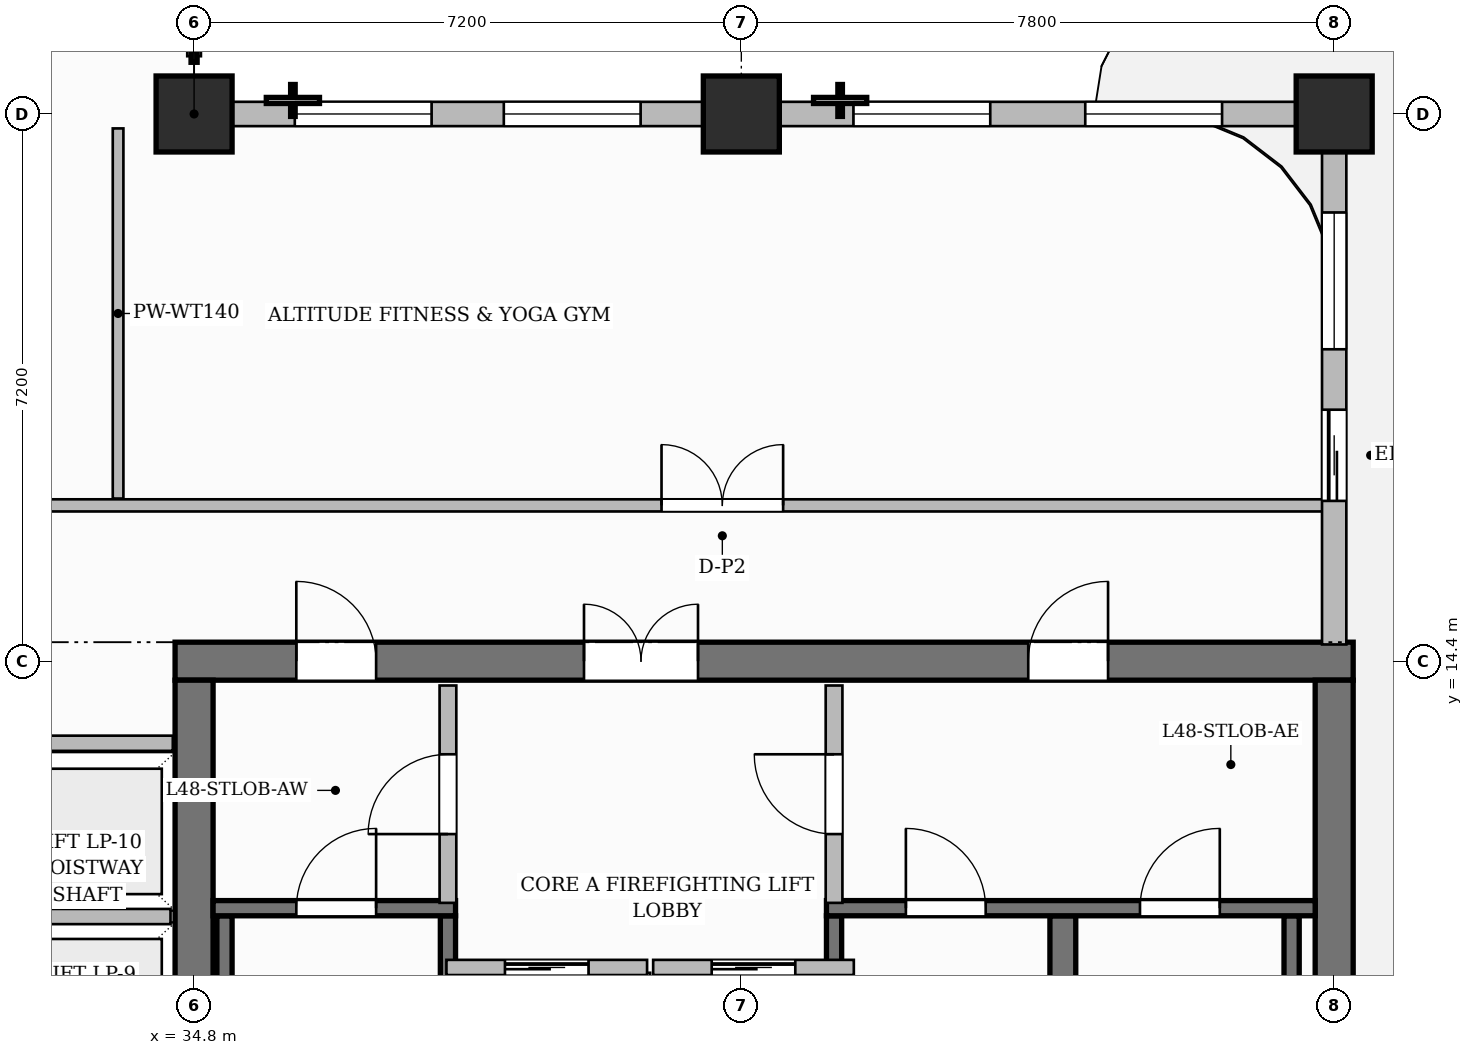
"""IFC4 building model, lengths in metres.
Left out: names, types, materials, properties, quantities, classifications, styles, units other than length and angle.
Written with IfcOpenShell. Run it as: python <this file> out.ifc"""

import sys

from ifc_helpers import new_model, si_unit, direction, frame, frame_2d, origin, origin_2d, place, context, subcontext, project, spatial, rectangle, extrude, source, transform, mapped, element, fill, save


model = new_model("IFC4")
c1 = context("Model", 3, precision=1e-05, world=origin(), true_north=direction((0.0, 1.0)))
c2 = subcontext(c1, "Body", "Model", "MODEL_VIEW")
j1 = project(units=[si_unit("LENGTHUNIT", "METRE"), si_unit("PLANEANGLEUNIT", "RADIAN")], contexts=[c1])
p1 = place(None, origin())
s1 = spatial("IfcSite", under=j1, at=p1, CompositionType="ELEMENT")
p2 = place(p1, origin())
s2 = spatial("IfcBuilding", under=s1, at=p2, CompositionType="ELEMENT")
p3 = place(p2, frame((0.0, 0.0, 192.65)))
s3 = spatial("IfcBuildingStorey", under=s2, at=p3, CompositionType="ELEMENT", Elevation=192.65)
p4 = place(p3, frame((34.55, 14.4, 0.0), z_axis=(0.0, 0.0, 1.0), x_axis=(1.0, 0.0, 0.0)))
e1 = element("IfcWall", 1, at=p4, inside=s3, PredefinedType="SHEAR", context=c2, shape_type="SweptSolid", body=[
    extrude(rectangle(XDim=15.5, YDim=0.5, at=frame_2d((7.75, 0.0))), origin(), (0.0, 0.0, 1.0), 3.85),
])
p5 = place(p4, frame((5.38, 0.0, 0.0)))
e2 = element("IfcOpeningElement", 2, at=p5, cuts=e1, PredefinedType="OPENING", context=c2, shape_type="SweptSolid", body=[
    extrude(rectangle(XDim=1.5, YDim=2.2, at=frame_2d((0.75, 1.1))), frame((0.0, 0.26, 0.0), z_axis=(0.0, -1.0, 0.0), x_axis=(1.0, 0.0, 0.0)), (0.0, 0.0, 1.0), 0.52),
])
p6 = place(p4, frame((1.595, 0.0, 0.0)))
e3 = element("IfcOpeningElement", 3, at=p6, cuts=e1, PredefinedType="OPENING", context=c2, shape_type="SweptSolid", body=[
    extrude(rectangle(XDim=1.05, YDim=2.15, at=frame_2d((0.525, 1.075))), frame((0.0, 0.26, 0.0), z_axis=(0.0, -1.0, 0.0), x_axis=(1.0, 0.0, 0.0)), (0.0, 0.0, 1.0), 0.52),
])
p7 = place(p4, frame((11.225, 0.0, 0.0)))
e4 = element("IfcOpeningElement", 4, at=p7, cuts=e1, PredefinedType="OPENING", context=c2, shape_type="SweptSolid", body=[
    extrude(rectangle(XDim=1.05, YDim=2.15, at=frame_2d((0.525, 1.075))), frame((0.0, 0.26, 0.0), z_axis=(0.0, -1.0, 0.0), x_axis=(1.0, 0.0, 0.0)), (0.0, 0.0, 1.0), 0.52),
])
for number, where, z_axis, x_axis in (
    (5, (34.8, 3.85, 0.0), (0.0, 0.0, 1.0), (0.0, 1.0, 0.0)),
    (6, (49.8, 3.85, 0.0), (0.0, 0.0, 1.0), (0.0, 1.0, 0.0)),
):
    element("IfcWall", number, at=place(p3, frame(where, z_axis=z_axis, x_axis=x_axis)), inside=s3, PredefinedType="SHEAR", context=c2, shape_type="SweptSolid", body=[
        extrude(rectangle(XDim=10.3, YDim=0.5, at=frame_2d((5.15, 0.0))), origin(), (0.0, 0.0, 1.0), 3.85),
    ])
m1 = source(origin(), c2, "Body", "SweptSolid", [
    extrude(rectangle(XDim=1.0, YDim=1.0, at=origin_2d()), origin(), (0.0, 0.0, 1.0), 3.85),
])
for number, where, z_axis, x_axis in (
    (7, (34.8, 21.6, 0.0), (0.0, 0.0, 1.0), (1.0, 0.0, 0.0)),
    (8, (42.0, 21.6, 0.0), (0.0, 0.0, 1.0), (1.0, 0.0, 0.0)),
    (9, (49.8, 21.6, 0.0), (0.0, 0.0, 1.0), (1.0, 0.0, 0.0)),
):
    element("IfcColumn", number, at=place(p3, frame(where, z_axis=z_axis, x_axis=x_axis)), inside=s3, PredefinedType="COLUMN", context=c2, shape_type="MappedRepresentation", body=[
        mapped(m1, transform((0.0, 0.0, 0.0), scale=1.0)),
    ])
for number, where, z_axis, x_axis in (
    (10, (35.2, 4.1, 0.0), (0.0, 0.0, 1.0), (0.0, 1.0, 0.0)),
    (11, (38.14, 4.1, 0.0), (0.0, 0.0, 1.0), (0.0, 1.0, 0.0)),
):
    element("IfcWall", number, at=place(p3, frame(where, z_axis=z_axis, x_axis=x_axis)), inside=s3, PredefinedType="SHEAR", context=c2, shape_type="SweptSolid", body=[
        extrude(rectangle(XDim=6.95, YDim=0.2, at=frame_2d((3.475, 0.0))), origin(), (0.0, 0.0, 1.0), 3.85),
    ])
p8 = place(p3, frame((35.05, 11.15, 0.0), z_axis=(0.0, 0.0, 1.0), x_axis=(1.0, 0.0, 0.0)))
e12 = element("IfcWall", 12, at=p8, inside=s3, PredefinedType="SHEAR", context=c2, shape_type="SweptSolid", body=[
    extrude(rectangle(XDim=3.19, YDim=0.2, at=frame_2d((1.595, 0.0))), origin(), (0.0, 0.0, 1.0), 3.85),
])
p9 = place(p8, frame((1.095, 0.0, 0.0)))
e13 = element("IfcOpeningElement", 13, at=p9, cuts=e12, PredefinedType="OPENING", context=c2, shape_type="SweptSolid", body=[
    extrude(rectangle(XDim=1.05, YDim=2.2, at=frame_2d((0.525, 1.1))), frame((0.0, 0.11, 0.0), z_axis=(0.0, -1.0, 0.0), x_axis=(1.0, 0.0, 0.0)), (0.0, 0.0, 1.0), 0.22),
])
p10 = place(p3, frame((43.22, 4.1, 0.0), z_axis=(0.0, 0.0, 1.0), x_axis=(0.0, 1.0, 0.0)))
e14 = element("IfcWall", 14, at=p10, inside=s3, PredefinedType="SHEAR", context=c2, shape_type="SweptSolid", body=[
    extrude(rectangle(XDim=6.95, YDim=0.2, at=frame_2d((3.475, 0.0))), origin(), (0.0, 0.0, 1.0), 3.85),
])
p11 = place(p3, frame((46.23, 4.1, 0.0), z_axis=(0.0, 0.0, 1.0), x_axis=(0.0, 1.0, 0.0)))
e15 = element("IfcWall", 15, at=p11, inside=s3, PredefinedType="SHEAR", context=c2, shape_type="SweptSolid", body=[
    extrude(rectangle(XDim=6.95, YDim=0.34, at=frame_2d((3.475, 0.0))), origin(), (0.0, 0.0, 1.0), 3.85),
])
p12 = place(p3, frame((49.24, 4.1, 0.0), z_axis=(0.0, 0.0, 1.0), x_axis=(0.0, 1.0, 0.0)))
e16 = element("IfcWall", 16, at=p12, inside=s3, PredefinedType="SHEAR", context=c2, shape_type="SweptSolid", body=[
    extrude(rectangle(XDim=6.95, YDim=0.2, at=frame_2d((3.475, 0.0))), origin(), (0.0, 0.0, 1.0), 3.85),
])
p13 = place(p3, frame((43.12, 11.15, 0.0), z_axis=(0.0, 0.0, 1.0), x_axis=(1.0, 0.0, 0.0)))
e17 = element("IfcWall", 17, at=p13, inside=s3, PredefinedType="SHEAR", context=c2, shape_type="SweptSolid", body=[
    extrude(rectangle(XDim=6.43, YDim=0.2, at=frame_2d((3.215, 0.0))), origin(), (0.0, 0.0, 1.0), 3.85),
])
p14 = place(p13, frame((1.045, 0.0, 0.0)))
e18 = element("IfcOpeningElement", 18, at=p14, cuts=e17, PredefinedType="OPENING", context=c2, shape_type="SweptSolid", body=[
    extrude(rectangle(XDim=1.05, YDim=2.2, at=frame_2d((0.525, 1.1))), frame((0.0, 0.11, 0.0), z_axis=(0.0, -1.0, 0.0), x_axis=(1.0, 0.0, 0.0)), (0.0, 0.0, 1.0), 0.22),
])
p15 = place(p13, frame((4.125, 0.0, 0.0)))
e19 = element("IfcOpeningElement", 19, at=p15, cuts=e17, PredefinedType="OPENING", context=c2, shape_type="SweptSolid", body=[
    extrude(rectangle(XDim=1.05, YDim=2.2, at=frame_2d((0.525, 1.1))), frame((0.0, 0.11, 0.0), z_axis=(0.0, -1.0, 0.0), x_axis=(1.0, 0.0, 0.0)), (0.0, 0.0, 1.0), 0.22),
])
p16 = place(p3, frame((40.7, 8.12, 0.0), z_axis=(0.0, 0.0, 1.0), x_axis=(0.0, 1.0, 0.0)))
e20 = element("IfcWall", 20, at=p16, inside=s3, PredefinedType="PARTITIONING", context=c2, shape_type="SweptSolid", body=[
    extrude(rectangle(XDim=2.18, YDim=0.2, at=frame_2d((1.09, 0.0))), origin(), (0.0, 0.0, 1.0), 3.55),
])
p17 = place(p3, frame((38.14, 11.22, 0.0), z_axis=(0.0, 0.0, 1.0), x_axis=(0.0, 1.0, 0.0)))
e21 = element("IfcWall", 21, at=p17, inside=s3, PredefinedType="PARTITIONING", context=c2, shape_type="SweptSolid", body=[
    extrude(rectangle(XDim=2.86, YDim=0.22, at=frame_2d((1.43, 0.0))), origin(), (0.0, 0.0, 1.0), 3.55),
])
p18 = place(p17, frame((0.905, 0.0, 0.0)))
e22 = element("IfcOpeningElement", 22, at=p18, cuts=e21, PredefinedType="OPENING", context=c2, shape_type="SweptSolid", body=[
    extrude(rectangle(XDim=1.05, YDim=2.15, at=frame_2d((0.525, 1.075))), frame((0.0, 0.12, 0.0), z_axis=(0.0, -1.0, 0.0), x_axis=(1.0, 0.0, 0.0)), (0.0, 0.0, 1.0), 0.24),
])
p19 = place(p3, frame((43.22, 11.22, 0.0), z_axis=(0.0, 0.0, 1.0), x_axis=(0.0, 1.0, 0.0)))
e23 = element("IfcWall", 23, at=p19, inside=s3, PredefinedType="PARTITIONING", context=c2, shape_type="SweptSolid", body=[
    extrude(rectangle(XDim=2.86, YDim=0.22, at=frame_2d((1.43, 0.0))), origin(), (0.0, 0.0, 1.0), 3.55),
])
p20 = place(p19, frame((0.905, 0.0, 0.0)))
e24 = element("IfcOpeningElement", 24, at=p20, cuts=e23, PredefinedType="OPENING", context=c2, shape_type="SweptSolid", body=[
    extrude(rectangle(XDim=1.05, YDim=2.15, at=frame_2d((0.525, 1.075))), frame((0.0, 0.12, 0.0), z_axis=(0.0, -1.0, 0.0), x_axis=(1.0, 0.0, 0.0)), (0.0, 0.0, 1.0), 0.24),
])
p21 = place(p3, frame((32.16, 13.32, 0.0), z_axis=(0.0, 0.0, 1.0), x_axis=(1.0, 0.0, 0.0)))
e25 = element("IfcWall", 25, at=p21, inside=s3, PredefinedType="PARTITIONING", context=c2, shape_type="SweptSolid", body=[
    extrude(rectangle(XDim=2.36, YDim=0.2, at=frame_2d((1.18, 0.0))), origin(), (0.0, 0.0, 1.0), 3.55),
])
p22 = place(p3, frame((32.26, 11.04, 0.0), z_axis=(0.0, 0.0, 1.0), x_axis=(1.0, 0.0, 0.0)))
e26 = element("IfcWall", 26, at=p22, inside=s3, PredefinedType="PARTITIONING", context=c2, shape_type="SweptSolid", body=[
    extrude(rectangle(XDim=2.23, YDim=0.2, at=frame_2d((1.115, 0.0))), origin(), (0.0, 0.0, 1.0), 3.55),
])
p23 = place(p3, frame((30.29, 16.45, 0.0), z_axis=(0.0, 0.0, 1.0), x_axis=(1.0, 0.0, 0.0)))
e27 = element("IfcWall", 27, at=p23, inside=s3, PredefinedType="PARTITIONING", context=c2, shape_type="SweptSolid", body=[
    extrude(rectangle(XDim=19.37, YDim=0.16, at=frame_2d((9.685, 0.0))), origin(), (0.0, 0.0, 1.0), 3.55),
])
p24 = place(p23, frame((1.285, 0.0, 0.0)))
e28 = element("IfcOpeningElement", 28, at=p24, cuts=e27, PredefinedType="OPENING", context=c2, shape_type="SweptSolid", body=[
    extrude(rectangle(XDim=0.85, YDim=2.1, at=frame_2d((0.425, 1.05))), frame((0.0, 0.09, 0.0), z_axis=(0.0, -1.0, 0.0), x_axis=(1.0, 0.0, 0.0)), (0.0, 0.0, 1.0), 0.18),
])
p25 = place(p23, frame((10.66, 0.0, 0.0)))
e29 = element("IfcOpeningElement", 29, at=p25, cuts=e27, PredefinedType="OPENING", context=c2, shape_type="SweptSolid", body=[
    extrude(rectangle(XDim=1.6, YDim=2.4, at=frame_2d((0.8, 1.2))), frame((0.0, 0.09, 0.0), z_axis=(0.0, -1.0, 0.0), x_axis=(1.0, 0.0, 0.0)), (0.0, 0.0, 1.0), 0.18),
])
p26 = place(p3, frame((33.8, 16.54, 0.0), z_axis=(0.0, 0.0, 1.0), x_axis=(0.0, 1.0, 0.0)))
e30 = element("IfcWall", 30, at=p26, inside=s3, PredefinedType="PARTITIONING", context=c2, shape_type="SweptSolid", body=[
    extrude(rectangle(XDim=4.87, YDim=0.14, at=frame_2d((2.435, 0.0))), origin(), (0.0, 0.0, 1.0), 3.55),
])
p27 = place(p3, frame((38.12, 10.37, 0.0), z_axis=(0.0, 0.0, 1.0), x_axis=(1.0, 0.0, 0.0)))
e31 = element("IfcWall", 31, at=p27, inside=s3, PredefinedType="PARTITIONING", context=c2, shape_type="SweptSolid", body=[
    extrude(rectangle(XDim=2.64, YDim=0.2, at=frame_2d((1.32, 0.0))), origin(), (0.0, 0.0, 1.0), 3.55),
])
p28 = place(p27, frame((0.77, 0.0, 0.0)))
e32 = element("IfcOpeningElement", 32, at=p28, cuts=e31, PredefinedType="OPENING", context=c2, shape_type="SweptSolid", body=[
    extrude(rectangle(XDim=1.1, YDim=2.2, at=frame_2d((0.55, 1.1))), frame((0.0, 0.11, 0.0), z_axis=(0.0, -1.0, 0.0), x_axis=(1.0, 0.0, 0.0)), (0.0, 0.0, 1.0), 0.22),
])
p29 = place(p3, frame((40.84, 10.37, 0.0), z_axis=(0.0, 0.0, 1.0), x_axis=(1.0, 0.0, 0.0)))
e33 = element("IfcWall", 33, at=p29, inside=s3, PredefinedType="PARTITIONING", context=c2, shape_type="SweptSolid", body=[
    extrude(rectangle(XDim=2.64, YDim=0.2, at=frame_2d((1.32, 0.0))), origin(), (0.0, 0.0, 1.0), 3.55),
])
p30 = place(p29, frame((0.77, 0.0, 0.0)))
e34 = element("IfcOpeningElement", 34, at=p30, cuts=e33, PredefinedType="OPENING", context=c2, shape_type="SweptSolid", body=[
    extrude(rectangle(XDim=1.1, YDim=2.2, at=frame_2d((0.55, 1.1))), frame((0.0, 0.11, 0.0), z_axis=(0.0, -1.0, 0.0), x_axis=(1.0, 0.0, 0.0)), (0.0, 0.0, 1.0), 0.22),
])
p31 = place(p3, frame((49.8, 14.62, 0.0), z_axis=(0.0, 0.0, 1.0), x_axis=(0.0, 1.0, 0.0)))
e35 = element("IfcWall", 35, at=p31, inside=s3, PredefinedType="SOLIDWALL", context=c2, shape_type="SweptSolid", body=[
    extrude(rectangle(XDim=6.93, YDim=0.32, at=frame_2d((3.465, 0.0))), origin(), (0.0, 0.0, 1.0), 3.035),
])
p32 = place(p31, frame((1.889, 0.0, 0.0)))
e36 = element("IfcOpeningElement", 36, at=p32, cuts=e35, PredefinedType="OPENING", context=c2, shape_type="SweptSolid", body=[
    extrude(rectangle(XDim=1.2, YDim=2.2, at=frame_2d((0.6, 1.1))), frame((0.0, 0.17, 0.0), z_axis=(0.0, -1.0, 0.0), x_axis=(1.0, 0.0, 0.0)), (0.0, 0.0, 1.0), 0.34),
])
p33 = place(p31, frame((3.884, 0.0, 0.8)))
e37 = element("IfcOpeningElement", 37, at=p33, cuts=e35, PredefinedType="OPENING", context=c2, shape_type="SweptSolid", body=[
    extrude(rectangle(XDim=1.8, YDim=1.85, at=frame_2d((0.9, 0.925))), frame((0.0, 0.17, 0.0), z_axis=(0.0, -1.0, 0.0), x_axis=(1.0, 0.0, 0.0)), (0.0, 0.0, 1.0), 0.34),
])
p34 = place(p3, frame((34.8, 21.6, 0.0), z_axis=(0.0, 0.0, 1.0), x_axis=(1.0, 0.0, 0.0)))
e38 = element("IfcWall", 38, at=p34, inside=s3, PredefinedType="SOLIDWALL", context=c2, shape_type="SweptSolid", body=[
    extrude(rectangle(XDim=15.0, YDim=0.32, at=frame_2d((7.5, 0.0))), origin(), (0.0, 0.0, 1.0), 3.035),
])
p35 = place(p34, frame((1.325, 0.0, 0.8)))
e39 = element("IfcOpeningElement", 39, at=p35, cuts=e38, PredefinedType="OPENING", context=c2, shape_type="SweptSolid", body=[
    extrude(rectangle(XDim=1.8, YDim=1.85, at=frame_2d((0.9, 0.925))), frame((0.0, 0.17, 0.0), z_axis=(0.0, -1.0, 0.0), x_axis=(1.0, 0.0, 0.0)), (0.0, 0.0, 1.0), 0.34),
])
p36 = place(p34, frame((4.075, 0.0, 0.8)))
e40 = element("IfcOpeningElement", 40, at=p36, cuts=e38, PredefinedType="OPENING", context=c2, shape_type="SweptSolid", body=[
    extrude(rectangle(XDim=1.8, YDim=1.85, at=frame_2d((0.9, 0.925))), frame((0.0, 0.17, 0.0), z_axis=(0.0, -1.0, 0.0), x_axis=(1.0, 0.0, 0.0)), (0.0, 0.0, 1.0), 0.34),
])
p37 = place(p34, frame((8.675, 0.0, 0.8)))
e41 = element("IfcOpeningElement", 41, at=p37, cuts=e38, PredefinedType="OPENING", context=c2, shape_type="SweptSolid", body=[
    extrude(rectangle(XDim=1.8, YDim=1.85, at=frame_2d((0.9, 0.925))), frame((0.0, 0.17, 0.0), z_axis=(0.0, -1.0, 0.0), x_axis=(1.0, 0.0, 0.0)), (0.0, 0.0, 1.0), 0.34),
])
p38 = place(p34, frame((11.725, 0.0, 0.8)))
e42 = element("IfcOpeningElement", 42, at=p38, cuts=e38, PredefinedType="OPENING", context=c2, shape_type="SweptSolid", body=[
    extrude(rectangle(XDim=1.8, YDim=1.85, at=frame_2d((0.9, 0.925))), frame((0.0, 0.17, 0.0), z_axis=(0.0, -1.0, 0.0), x_axis=(1.0, 0.0, 0.0)), (0.0, 0.0, 1.0), 0.34),
])
m2 = source(origin(), c2, "Body", "SweptSolid", [
    extrude(rectangle(XDim=1.05, YDim=2.2, at=frame_2d((0.525, 1.1))), frame((0.0, 0.025, 0.0), z_axis=(0.0, -1.0, 0.0), x_axis=(1.0, 0.0, 0.0)), (0.0, 0.0, 1.0), 0.05),
])
p39 = place(p9, origin())
e43 = element("IfcDoor", 43, at=p39, inside=s3, OperationType="SINGLE_SWING_RIGHT", PredefinedType="DOOR", context=c2, shape_type="MappedRepresentation", body=[
    mapped(m2, transform((0.0, 0.0, 0.0), scale=1.0)),
])
fill(e13, e43)
p40 = place(p14, origin())
e44 = element("IfcDoor", 44, at=p40, inside=s3, OperationType="SINGLE_SWING_LEFT", PredefinedType="DOOR", context=c2, shape_type="MappedRepresentation", body=[
    mapped(m2, transform((0.0, 0.0, 0.0), scale=1.0)),
])
fill(e18, e44)
p41 = place(p15, origin())
e45 = element("IfcDoor", 45, at=p41, inside=s3, OperationType="SINGLE_SWING_RIGHT", PredefinedType="DOOR", context=c2, shape_type="MappedRepresentation", body=[
    mapped(m2, transform((0.0, 0.0, 0.0), scale=1.0)),
])
fill(e19, e45)
m3 = source(origin(), c2, "Body", "SweptSolid", [
    extrude(rectangle(XDim=1.05, YDim=2.15, at=frame_2d((0.525, 1.075))), frame((0.0, 0.025, 0.0), z_axis=(0.0, -1.0, 0.0), x_axis=(1.0, 0.0, 0.0)), (0.0, 0.0, 1.0), 0.05),
])
p42 = place(p18, origin())
e46 = element("IfcDoor", 46, at=p42, inside=s3, OperationType="SINGLE_SWING_LEFT", PredefinedType="DOOR", context=c2, shape_type="MappedRepresentation", body=[
    mapped(m3, transform((0.0, 0.0, 0.0), scale=1.0)),
])
fill(e22, e46)
p43 = place(p20, origin())
e47 = element("IfcDoor", 47, at=p43, inside=s3, OperationType="SINGLE_SWING_RIGHT", PredefinedType="DOOR", context=c2, shape_type="MappedRepresentation", body=[
    mapped(m3, transform((0.0, 0.0, 0.0), scale=1.0)),
])
fill(e24, e47)
m4 = source(origin(), c2, "Body", "SweptSolid", [
    extrude(rectangle(XDim=1.5, YDim=2.2, at=frame_2d((0.75, 1.1))), frame((0.0, 0.025, 0.0), z_axis=(0.0, -1.0, 0.0), x_axis=(1.0, 0.0, 0.0)), (0.0, 0.0, 1.0), 0.05),
])
p44 = place(p5, origin())
e48 = element("IfcDoor", 48, at=p44, inside=s3, OperationType="DOUBLE_DOOR_SINGLE_SWING", PredefinedType="DOOR", context=c2, shape_type="MappedRepresentation", body=[
    mapped(m4, transform((0.0, 0.0, 0.0), scale=1.0)),
])
fill(e2, e48)
p45 = place(p6, origin())
e49 = element("IfcDoor", 49, at=p45, inside=s3, OperationType="SINGLE_SWING_LEFT", PredefinedType="DOOR", context=c2, shape_type="MappedRepresentation", body=[
    mapped(m3, transform((0.0, 0.0, 0.0), scale=1.0)),
])
fill(e3, e49)
p46 = place(p7, origin())
e50 = element("IfcDoor", 50, at=p46, inside=s3, OperationType="SINGLE_SWING_RIGHT", PredefinedType="DOOR", context=c2, shape_type="MappedRepresentation", body=[
    mapped(m3, transform((0.0, 0.0, 0.0), scale=1.0)),
])
fill(e4, e50)
m5 = source(origin(), c2, "Body", "SweptSolid", [
    extrude(rectangle(XDim=1.6, YDim=2.4, at=frame_2d((0.8, 1.2))), frame((0.0, 0.025, 0.0), z_axis=(0.0, -1.0, 0.0), x_axis=(1.0, 0.0, 0.0)), (0.0, 0.0, 1.0), 0.05),
])
p47 = place(p25, origin())
e51 = element("IfcDoor", 51, at=p47, inside=s3, OperationType="DOUBLE_DOOR_SINGLE_SWING", PredefinedType="DOOR", context=c2, shape_type="MappedRepresentation", body=[
    mapped(m5, transform((0.0, 0.0, 0.0), scale=1.0)),
])
fill(e29, e51)
m6 = source(origin(), c2, "Body", "SweptSolid", [
    extrude(rectangle(XDim=1.1, YDim=2.2, at=frame_2d((0.55, 1.1))), frame((0.0, 0.025, 0.0), z_axis=(0.0, -1.0, 0.0), x_axis=(1.0, 0.0, 0.0)), (0.0, 0.0, 1.0), 0.05),
])
p48 = place(p28, origin())
e52 = element("IfcDoor", 52, at=p48, inside=s3, OperationType="SLIDING_TO_LEFT", PredefinedType="DOOR", context=c2, shape_type="MappedRepresentation", body=[
    mapped(m6, transform((0.0, 0.0, 0.0), scale=1.0)),
])
fill(e32, e52)
p49 = place(p30, origin())
e53 = element("IfcDoor", 53, at=p49, inside=s3, OperationType="SLIDING_TO_LEFT", PredefinedType="DOOR", context=c2, shape_type="MappedRepresentation", body=[
    mapped(m6, transform((0.0, 0.0, 0.0), scale=1.0)),
])
fill(e34, e53)
m7 = source(origin(), c2, "Body", "SweptSolid", [
    extrude(rectangle(XDim=1.2, YDim=2.2, at=frame_2d((0.6, 1.1))), frame((0.0, 0.025, 0.0), z_axis=(0.0, -1.0, 0.0), x_axis=(1.0, 0.0, 0.0)), (0.0, 0.0, 1.0), 0.05),
])
p50 = place(p32, origin())
e54 = element("IfcDoor", 54, at=p50, inside=s3, OperationType="SLIDING_TO_LEFT", PredefinedType="DOOR", context=c2, shape_type="MappedRepresentation", body=[
    mapped(m7, transform((0.0, 0.0, 0.0), scale=1.0)),
])
fill(e36, e54)
m8 = source(origin(), c2, "Body", "SweptSolid", [
    extrude(rectangle(XDim=1.8, YDim=1.85, at=frame_2d((0.9, 0.925))), frame((0.0, 0.03, 0.0), z_axis=(0.0, -1.0, 0.0), x_axis=(1.0, 0.0, 0.0)), (0.0, 0.0, 1.0), 0.06),
])
p51 = place(p33, origin())
e55 = element("IfcWindow", 55, at=p51, inside=s3, PartitioningType="DOUBLE_PANEL_VERTICAL", PredefinedType="WINDOW", context=c2, shape_type="MappedRepresentation", body=[
    mapped(m8, transform((0.0, 0.0, 0.0), scale=1.0)),
])
fill(e37, e55)
p52 = place(p35, origin())
e56 = element("IfcWindow", 56, at=p52, inside=s3, PartitioningType="DOUBLE_PANEL_VERTICAL", PredefinedType="WINDOW", context=c2, shape_type="MappedRepresentation", body=[
    mapped(m8, transform((0.0, 0.0, 0.0), scale=1.0)),
])
fill(e39, e56)
p53 = place(p36, origin())
e57 = element("IfcWindow", 57, at=p53, inside=s3, PartitioningType="DOUBLE_PANEL_VERTICAL", PredefinedType="WINDOW", context=c2, shape_type="MappedRepresentation", body=[
    mapped(m8, transform((0.0, 0.0, 0.0), scale=1.0)),
])
fill(e40, e57)
p54 = place(p37, origin())
e58 = element("IfcWindow", 58, at=p54, inside=s3, PartitioningType="DOUBLE_PANEL_VERTICAL", PredefinedType="WINDOW", context=c2, shape_type="MappedRepresentation", body=[
    mapped(m8, transform((0.0, 0.0, 0.0), scale=1.0)),
])
fill(e41, e58)
p55 = place(p38, origin())
e59 = element("IfcWindow", 59, at=p55, inside=s3, PartitioningType="DOUBLE_PANEL_VERTICAL", PredefinedType="WINDOW", context=c2, shape_type="MappedRepresentation", body=[
    mapped(m8, transform((0.0, 0.0, 0.0), scale=1.0)),
])
fill(e42, e59)
save(model, sys.argv[1])
